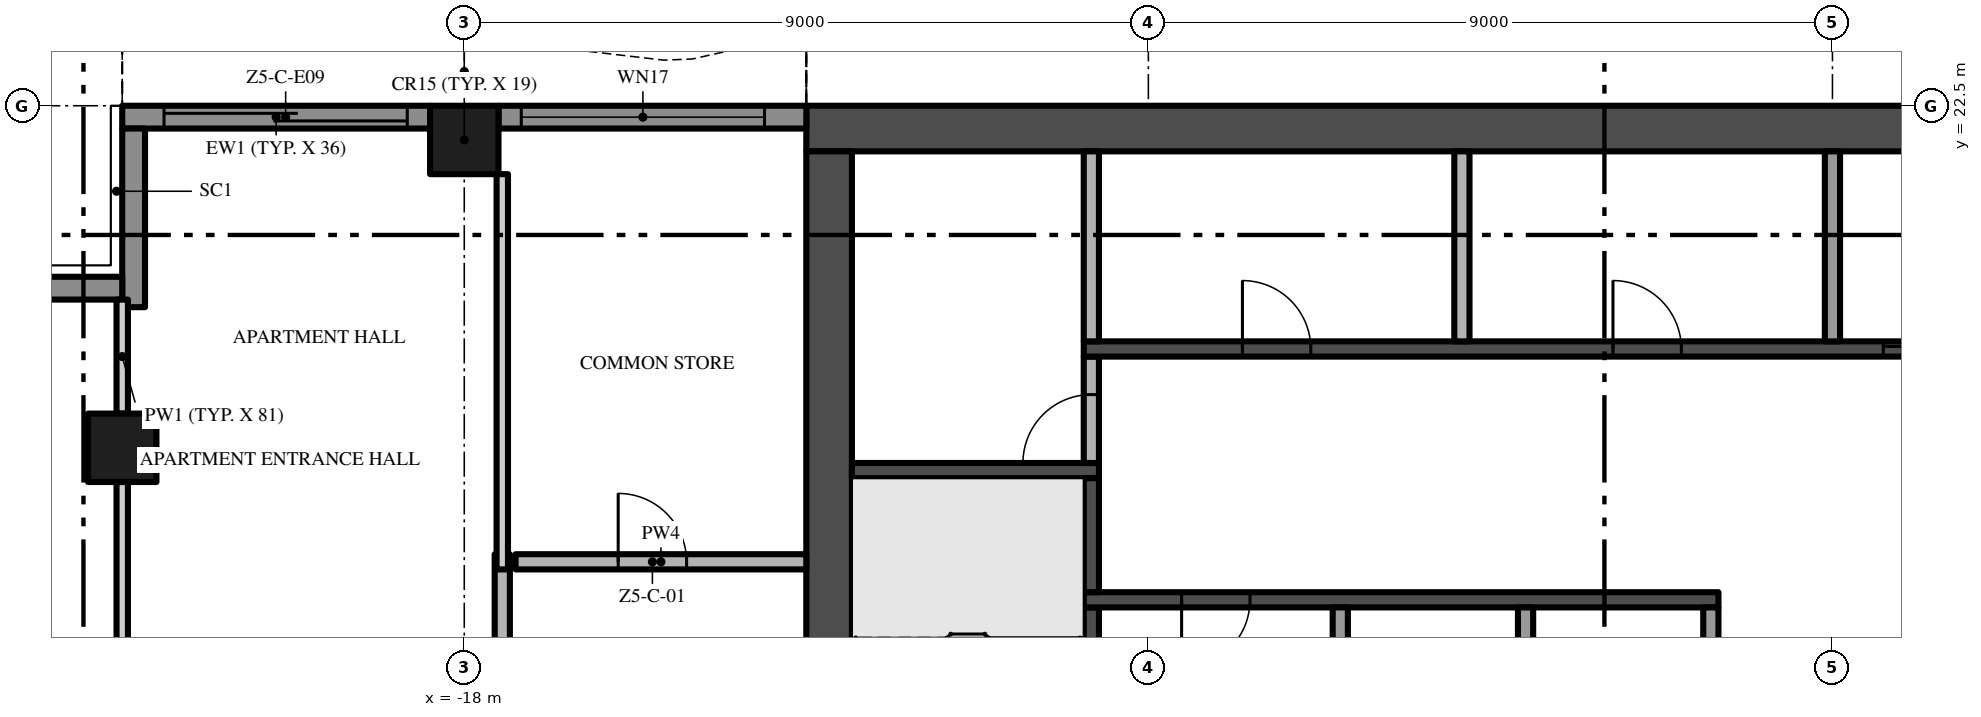
"""IFC4 building model, lengths in metres.
Left out: names, types, materials, properties, quantities, classifications, styles, units other than length and angle.
Written with IfcOpenShell. Run it as: python <this file> out.ifc"""

import sys

from ifc_helpers import new_model, si_unit, direction, frame, frame_2d, origin, origin_2d, place, context, subcontext, project, spatial, polyline, rectangle, outline, extrude, element, fill, save


model = new_model("IFC4")
c1 = context("Model", 3, precision=1e-05, world=origin(), true_north=direction((0.0, 1.0)))
c2 = subcontext(c1, "Body", "Model", "MODEL_VIEW")
j1 = project(units=[si_unit("LENGTHUNIT", "METRE"), si_unit("PLANEANGLEUNIT", "RADIAN")], contexts=[c1])
p1 = place(None, origin())
s1 = spatial("IfcSite", under=j1, at=p1, CompositionType="ELEMENT")
p2 = place(p1, origin())
s2 = spatial("IfcBuilding", under=s1, at=p2, CompositionType="ELEMENT")
p3 = place(p2, frame((0.0, 0.0, 261.6)))
s3 = spatial("IfcBuildingStorey", under=s2, at=p3, CompositionType="ELEMENT", Elevation=261.6)
p4 = place(p3, frame((13.5, 22.2, -0.3), z_axis=(0.0, 0.0, 1.0), x_axis=(-1.0, 0.0, 0.0)))
e1 = element("IfcWall", 1, at=p4, inside=s3, PredefinedType="SHEAR", context=c2, shape_type="SweptSolid", body=[
    extrude(rectangle(XDim=27.0, YDim=0.6, at=frame_2d((13.5, 0.0))), origin(), (0.0, 0.0, 1.0), 3.8),
])
p5 = place(p3, frame((-13.2, 21.9, -0.3), z_axis=(0.0, 0.0, 1.0), x_axis=(0.0, -1.0, 0.0)))
e2 = element("IfcWall", 2, at=p5, inside=s3, PredefinedType="SHEAR", context=c2, shape_type="SweptSolid", body=[
    extrude(rectangle(XDim=16.8, YDim=0.6, at=frame_2d((8.4, 0.0))), origin(), (0.0, 0.0, 1.0), 3.8),
])
p6 = place(p5, frame((9.3, 0.0, 0.3)))
e3 = element("IfcOpeningElement", 3, at=p6, cuts=e2, PredefinedType="OPENING", context=c2, shape_type="SweptSolid", body=[
    extrude(rectangle(XDim=1.2, YDim=2.2, at=frame_2d((0.6, 1.1))), frame((0.0, 0.31, 0.0), z_axis=(0.0, -1.0, 0.0), x_axis=(1.0, 0.0, 0.0)), (0.0, 0.0, 1.0), 0.62),
])
for number, where, z_axis, x_axis in (
    (4, (-18.0, 22.05, 0.0), (0.0, 0.0, 1.0), (1.0, 0.0, 0.0)),
    (5, (-22.5, 18.0, 0.0), (0.0, 0.0, 1.0), (1.0, 0.0, 0.0)),
):
    element("IfcColumn", number, at=place(p3, frame(where, z_axis=z_axis, x_axis=x_axis)), inside=s3, PredefinedType="COLUMN", context=c2, shape_type="SweptSolid", body=[
        extrude(rectangle(XDim=0.9, YDim=0.9, at=origin_2d()), origin(), (0.0, 0.0, 1.0), 3.5),
    ])
p7 = place(p3, frame((-17.55, 22.35, 0.0), z_axis=(0.0, 0.0, 1.0), x_axis=(1.0, 0.0, 0.0)))
e6 = element("IfcWall", 6, at=p7, inside=s3, PredefinedType="SOLIDWALL", context=c2, shape_type="SweptSolid", body=[
    extrude(rectangle(XDim=4.05, YDim=0.3, at=frame_2d((2.025, 0.0))), origin(), (0.0, 0.0, 1.0), 3.5),
])
p8 = place(p7, frame((0.3, 0.0, 0.45)))
e7 = element("IfcOpeningElement", 7, at=p8, cuts=e6, PredefinedType="OPENING", context=c2, shape_type="SweptSolid", body=[
    extrude(rectangle(XDim=3.2, YDim=2.65, at=frame_2d((1.6, 1.325))), frame((0.0, 0.16, 0.0), z_axis=(0.0, -1.0, 0.0), x_axis=(1.0, 0.0, 0.0)), (0.0, 0.0, 1.0), 0.32),
])
p9 = place(p3, frame((-22.5, 22.35, 0.0), z_axis=(0.0, 0.0, 1.0), x_axis=(1.0, 0.0, 0.0)))
e8 = element("IfcWall", 8, at=p9, inside=s3, PredefinedType="SOLIDWALL", context=c2, shape_type="SweptSolid", body=[
    extrude(rectangle(XDim=4.05, YDim=0.3, at=frame_2d((2.025, 0.0))), origin(), (0.0, 0.0, 1.0), 3.5),
])
p10 = place(p9, frame((0.55, 0.0, 0.0)))
e9 = element("IfcOpeningElement", 9, at=p10, cuts=e8, PredefinedType="OPENING", context=c2, shape_type="SweptSolid", body=[
    extrude(rectangle(XDim=3.2, YDim=2.4, at=frame_2d((1.6, 1.2))), frame((0.0, 0.16, 0.0), z_axis=(0.0, -1.0, 0.0), x_axis=(1.0, 0.0, 0.0)), (0.0, 0.0, 1.0), 0.32),
])
p11 = place(p3, frame((-22.35, 19.85, 0.0), z_axis=(0.0, 0.0, 1.0), x_axis=(0.0, 1.0, 0.0)))
e10 = element("IfcWall", 10, at=p11, inside=s3, PredefinedType="SOLIDWALL", context=c2, shape_type="SweptSolid", body=[
    extrude(rectangle(XDim=2.35, YDim=0.3, at=frame_2d((1.175, 0.0))), origin(), (0.0, 0.0, 1.0), 3.5),
])
p12 = place(p3, frame((-24.75, 20.1, 0.0), z_axis=(0.0, 0.0, 1.0), x_axis=(1.0, 0.0, 0.0)))
e11 = element("IfcWall", 11, at=p12, inside=s3, PredefinedType="SOLIDWALL", context=c2, shape_type="SweptSolid", body=[
    extrude(rectangle(XDim=2.25, YDim=0.3, at=frame_2d((1.125, 0.0))), origin(), (0.0, 0.0, 1.0), 3.5),
])
p13 = place(p3, origin())
e12 = element("IfcWall", 12, at=p13, inside=s3, PredefinedType="USERDEFINED", context=c2, shape_type="SweptSolid", body=[
    extrude(outline(polyline([(-13.5, 23.451), (-15.0, 23.115), (-15.375, 23.1), (-16.5, 23.231), (-18.0, 23.755), (-19.5, 24.488), (-21.0, 25.149), (-22.5, 25.485), (-22.555, 25.241), (-21.079, 24.91), (-19.605, 24.261), (-18.096, 23.524), (-16.556, 22.986), (-15.385, 22.849), (-14.967, 22.866), (-13.445, 23.208), (-13.5, 23.451)])), origin(), (0.0, 0.0, 1.0), 0.9),
])
p14 = place(p3, frame((-12.9, 17.7, 0.0), z_axis=(0.0, 0.0, 1.0), x_axis=(1.0, 0.0, 0.0)))
e13 = element("IfcWall", 13, at=p14, inside=s3, PredefinedType="SHEAR", context=c2, shape_type="SweptSolid", body=[
    extrude(rectangle(XDim=3.25, YDim=0.2, at=frame_2d((1.625, 0.0))), origin(), (0.0, 0.0, 1.0), 3.5),
])
p15 = place(p3, frame((-9.75, 12.7, 0.0), z_axis=(0.0, 0.0, 1.0), x_axis=(0.0, 1.0, 0.0)))
e14 = element("IfcWall", 14, at=p15, inside=s3, PredefinedType="SHEAR", context=c2, shape_type="SweptSolid", body=[
    extrude(rectangle(XDim=3.2, YDim=0.2, at=frame_2d((1.6, 0.0))), origin(), (0.0, 0.0, 1.0), 3.5),
])
p16 = place(p3, frame((-1.5, 16.0, 0.0), z_axis=(0.0, 0.0, 1.0), x_axis=(-1.0, 0.0, 0.0)))
e15 = element("IfcWall", 15, at=p16, inside=s3, PredefinedType="SHEAR", context=c2, shape_type="SweptSolid", body=[
    extrude(rectangle(XDim=8.35, YDim=0.2, at=frame_2d((4.175, 0.0))), origin(), (0.0, 0.0, 1.0), 3.5),
])
p17 = place(p16, frame((6.162, 0.0, 0.0)))
e16 = element("IfcOpeningElement", 16, at=p17, cuts=e15, PredefinedType="OPENING", context=c2, shape_type="SweptSolid", body=[
    extrude(rectangle(XDim=0.9, YDim=2.1, at=frame_2d((0.45, 1.05))), frame((0.0, 0.11, 0.0), z_axis=(0.0, -1.0, 0.0), x_axis=(1.0, 0.0, 0.0)), (0.0, 0.0, 1.0), 0.22),
])
p18 = place(p3, frame((-9.75, 16.1, 0.0), z_axis=(0.0, 0.0, 1.0), x_axis=(0.0, 1.0, 0.0)))
e17 = element("IfcWall", 17, at=p18, inside=s3, PredefinedType="SHEAR", context=c2, shape_type="SweptSolid", body=[
    extrude(rectangle(XDim=1.5, YDim=0.2, at=frame_2d((0.75, 0.0))), origin(), (0.0, 0.0, 1.0), 3.5),
])
p19 = place(p3, frame((-9.75, 17.8, 0.0), z_axis=(0.0, 0.0, 1.0), x_axis=(0.0, 1.0, 0.0)))
e18 = element("IfcWall", 18, at=p19, inside=s3, PredefinedType="PARTITIONING", context=c2, shape_type="SweptSolid", body=[
    extrude(rectangle(XDim=1.4, YDim=0.2, at=frame_2d((0.7, 0.0))), origin(), (0.0, 0.0, 1.0), 3.5),
])
p20 = place(p19, origin())
e19 = element("IfcOpeningElement", 19, at=p20, cuts=e18, PredefinedType="OPENING", context=c2, shape_type="SweptSolid", body=[
    extrude(rectangle(XDim=0.9, YDim=2.1, at=frame_2d((0.45, 1.05))), frame((0.0, 0.11, 0.0), z_axis=(0.0, -1.0, 0.0), x_axis=(1.0, 0.0, 0.0)), (0.0, 0.0, 1.0), 0.22),
])
p21 = place(p3, frame((-9.85, 19.3, 0.0), z_axis=(0.0, 0.0, 1.0), x_axis=(1.0, 0.0, 0.0)))
e20 = element("IfcWall", 20, at=p21, inside=s3, PredefinedType="SHEAR", context=c2, shape_type="SweptSolid", body=[
    extrude(rectangle(XDim=19.7, YDim=0.2, at=frame_2d((9.85, 0.0))), origin(), (0.0, 0.0, 1.0), 3.5),
])
p22 = place(p21, frame((10.519, 0.0, 0.0)))
e21 = element("IfcOpeningElement", 21, at=p22, cuts=e20, PredefinedType="OPENING", context=c2, shape_type="SweptSolid", body=[
    extrude(rectangle(XDim=1.1, YDim=2.1, at=frame_2d((0.55, 1.05))), frame((0.0, 0.11, 0.0), z_axis=(0.0, -1.0, 0.0), x_axis=(1.0, 0.0, 0.0)), (0.0, 0.0, 1.0), 0.22),
])
p23 = place(p21, frame((12.956, 0.0, 0.0)))
e22 = element("IfcOpeningElement", 22, at=p23, cuts=e20, PredefinedType="OPENING", context=c2, shape_type="SweptSolid", body=[
    extrude(rectangle(XDim=1.1, YDim=2.1, at=frame_2d((0.55, 1.05))), frame((0.0, 0.11, 0.0), z_axis=(0.0, -1.0, 0.0), x_axis=(1.0, 0.0, 0.0)), (0.0, 0.0, 1.0), 0.22),
])
p24 = place(p21, frame((15.394, 0.0, 0.0)))
e23 = element("IfcOpeningElement", 23, at=p24, cuts=e20, PredefinedType="OPENING", context=c2, shape_type="SweptSolid", body=[
    extrude(rectangle(XDim=1.1, YDim=2.1, at=frame_2d((0.55, 1.05))), frame((0.0, 0.11, 0.0), z_axis=(0.0, -1.0, 0.0), x_axis=(1.0, 0.0, 0.0)), (0.0, 0.0, 1.0), 0.22),
])
p25 = place(p21, frame((17.831, 0.0, 0.0)))
e24 = element("IfcOpeningElement", 24, at=p25, cuts=e20, PredefinedType="OPENING", context=c2, shape_type="SweptSolid", body=[
    extrude(rectangle(XDim=1.1, YDim=2.1, at=frame_2d((0.55, 1.05))), frame((0.0, 0.11, 0.0), z_axis=(0.0, -1.0, 0.0), x_axis=(1.0, 0.0, 0.0)), (0.0, 0.0, 1.0), 0.22),
])
p26 = place(p21, frame((2.087, 0.0, 0.0)))
e25 = element("IfcOpeningElement", 25, at=p26, cuts=e20, PredefinedType="OPENING", context=c2, shape_type="SweptSolid", body=[
    extrude(rectangle(XDim=0.9, YDim=2.1, at=frame_2d((0.45, 1.05))), frame((0.0, 0.11, 0.0), z_axis=(0.0, -1.0, 0.0), x_axis=(1.0, 0.0, 0.0)), (0.0, 0.0, 1.0), 0.22),
])
p27 = place(p21, frame((6.963, 0.0, 0.0)))
e26 = element("IfcOpeningElement", 26, at=p27, cuts=e20, PredefinedType="OPENING", context=c2, shape_type="SweptSolid", body=[
    extrude(rectangle(XDim=0.9, YDim=2.1, at=frame_2d((0.45, 1.05))), frame((0.0, 0.11, 0.0), z_axis=(0.0, -1.0, 0.0), x_axis=(1.0, 0.0, 0.0)), (0.0, 0.0, 1.0), 0.22),
])
p28 = place(p3, frame((-9.75, 19.4, 0.0), z_axis=(0.0, 0.0, 1.0), x_axis=(0.0, 1.0, 0.0)))
e27 = element("IfcWall", 27, at=p28, inside=s3, PredefinedType="PARTITIONING", context=c2, shape_type="SweptSolid", body=[
    extrude(rectangle(XDim=2.5, YDim=0.2, at=frame_2d((1.25, 0.0))), origin(), (0.0, 0.0, 1.0), 3.5),
])
p29 = place(p3, frame((-6.475, 13.7, 0.0), z_axis=(0.0, 0.0, 1.0), x_axis=(0.0, 1.0, 0.0)))
e28 = element("IfcWall", 28, at=p29, inside=s3, PredefinedType="PARTITIONING", context=c2, shape_type="SweptSolid", body=[
    extrude(rectangle(XDim=2.2, YDim=0.2, at=frame_2d((1.1, 0.0))), origin(), (0.0, 0.0, 1.0), 3.5),
])
p30 = place(p3, frame((-4.875, 19.4, 0.0), z_axis=(0.0, 0.0, 1.0), x_axis=(0.0, 1.0, 0.0)))
e29 = element("IfcWall", 29, at=p30, inside=s3, PredefinedType="PARTITIONING", context=c2, shape_type="SweptSolid", body=[
    extrude(rectangle(XDim=2.5, YDim=0.2, at=frame_2d((1.25, 0.0))), origin(), (0.0, 0.0, 1.0), 3.5),
])
for number, where, z_axis, x_axis in (
    (30, (-4.037, 13.7, 0.0), (0.0, 0.0, 1.0), (0.0, 1.0, 0.0)),
    (31, (-1.6, 13.7, 0.0), (0.0, 0.0, 1.0), (0.0, 1.0, 0.0)),
):
    element("IfcWall", number, at=place(p3, frame(where, z_axis=z_axis, x_axis=x_axis)), inside=s3, PredefinedType="PARTITIONING", context=c2, shape_type="SweptSolid", body=[
        extrude(rectangle(XDim=2.2, YDim=0.2, at=frame_2d((1.1, 0.0))), origin(), (0.0, 0.0, 1.0), 3.5),
    ])
p31 = place(p3, frame((0.0, 19.4, 0.0), z_axis=(0.0, 0.0, 1.0), x_axis=(0.0, 1.0, 0.0)))
e32 = element("IfcWall", 32, at=p31, inside=s3, PredefinedType="PARTITIONING", context=c2, shape_type="SweptSolid", body=[
    extrude(rectangle(XDim=2.5, YDim=0.2, at=frame_2d((1.25, 0.0))), origin(), (0.0, 0.0, 1.0), 3.5),
])
p32 = place(p3, frame((-17.325, 16.5, 0.0), z_axis=(0.0, 0.0, 1.0), x_axis=(1.0, 0.0, 0.0)))
e33 = element("IfcWall", 33, at=p32, inside=s3, PredefinedType="PARTITIONING", context=c2, shape_type="SweptSolid", body=[
    extrude(rectangle(XDim=3.825, YDim=0.2, at=frame_2d((1.913, 0.0))), origin(), (0.0, 0.0, 1.0), 3.5),
])
p33 = place(p32, frame((1.35, 0.0, 0.0)))
e34 = element("IfcOpeningElement", 34, at=p33, cuts=e33, PredefinedType="OPENING", context=c2, shape_type="SweptSolid", body=[
    extrude(rectangle(XDim=0.9, YDim=2.1, at=frame_2d((0.45, 1.05))), frame((0.0, 0.11, 0.0), z_axis=(0.0, -1.0, 0.0), x_axis=(1.0, 0.0, 0.0)), (0.0, 0.0, 1.0), 0.22),
])
p34 = place(p3, frame((-22.5, 0.1, 0.0), z_axis=(0.0, 0.0, 1.0), x_axis=(0.0, 1.0, 0.0)))
e35 = element("IfcWall", 35, at=p34, inside=s3, PredefinedType="PARTITIONING", context=c2, shape_type="SweptSolid", body=[
    extrude(rectangle(XDim=17.45, YDim=0.15, at=frame_2d((8.725, 0.0))), origin(), (0.0, 0.0, 1.0), 3.5),
])
p35 = place(p34, frame((1.65, 0.0, 0.0)))
e36 = element("IfcOpeningElement", 36, at=p35, cuts=e35, PredefinedType="OPENING", context=c2, shape_type="SweptSolid", body=[
    extrude(rectangle(XDim=1.0, YDim=2.4, at=frame_2d((0.5, 1.2))), frame((0.0, 0.085, 0.0), z_axis=(0.0, -1.0, 0.0), x_axis=(1.0, 0.0, 0.0)), (0.0, 0.0, 1.0), 0.17),
])
p36 = place(p34, frame((5.0, 0.0, 0.0)))
e37 = element("IfcOpeningElement", 37, at=p36, cuts=e35, PredefinedType="OPENING", context=c2, shape_type="SweptSolid", body=[
    extrude(rectangle(XDim=1.0, YDim=2.4, at=frame_2d((0.5, 1.2))), frame((0.0, 0.085, 0.0), z_axis=(0.0, -1.0, 0.0), x_axis=(1.0, 0.0, 0.0)), (0.0, 0.0, 1.0), 0.17),
])
p37 = place(p34, frame((13.25, 0.0, 0.0)))
e38 = element("IfcOpeningElement", 38, at=p37, cuts=e35, PredefinedType="OPENING", context=c2, shape_type="SweptSolid", body=[
    extrude(rectangle(XDim=1.8, YDim=2.4, at=frame_2d((0.9, 1.2))), frame((0.0, 0.085, 0.0), z_axis=(0.0, -1.0, 0.0), x_axis=(1.0, 0.0, 0.0)), (0.0, 0.0, 1.0), 0.17),
])
p38 = place(p3, frame((-22.5, 18.45, 0.0), z_axis=(0.0, 0.0, 1.0), x_axis=(0.0, 1.0, 0.0)))
e39 = element("IfcWall", 39, at=p38, inside=s3, PredefinedType="PARTITIONING", context=c2, shape_type="SweptSolid", body=[
    extrude(rectangle(XDim=1.5, YDim=0.15, at=frame_2d((0.75, 0.0))), origin(), (0.0, 0.0, 1.0), 3.5),
])
p39 = place(p3, frame((-17.5, 13.975, 0.0), z_axis=(0.0, 0.0, 1.0), x_axis=(0.0, 1.0, 0.0)))
e40 = element("IfcWall", 40, at=p39, inside=s3, PredefinedType="PARTITIONING", context=c2, shape_type="SweptSolid", body=[
    extrude(rectangle(XDim=2.625, YDim=0.2, at=frame_2d((1.312, 0.0))), origin(), (0.0, 0.0, 1.0), 3.5),
])
p40 = place(p39, frame((0.15, 0.0, 0.0)))
e41 = element("IfcOpeningElement", 41, at=p40, cuts=e40, PredefinedType="OPENING", context=c2, shape_type="SweptSolid", body=[
    extrude(rectangle(XDim=1.2, YDim=2.4, at=frame_2d((0.6, 1.2))), frame((0.0, 0.11, 0.0), z_axis=(0.0, -1.0, 0.0), x_axis=(1.0, 0.0, 0.0)), (0.0, 0.0, 1.0), 0.22),
])
p41 = place(p3, frame((-17.5, 16.4, 0.0), z_axis=(0.0, 0.0, 1.0), x_axis=(0.0, 1.0, 0.0)))
e42 = element("IfcWall", 42, at=p41, inside=s3, PredefinedType="PARTITIONING", context=c2, shape_type="SweptSolid", body=[
    extrude(rectangle(XDim=5.2, YDim=0.15, at=frame_2d((2.6, 0.0))), origin(), (0.0, 0.0, 1.0), 3.5),
])
p42 = place(p8, origin())
e43 = element("IfcWindow", 43, at=p42, inside=s3, PartitioningType="SINGLE_PANEL", PredefinedType="WINDOW", context=c2, shape_type="SweptSolid", body=[
    extrude(rectangle(XDim=3.2, YDim=2.65, at=frame_2d((1.6, 1.325))), frame((0.0, 0.03, 0.0), z_axis=(0.0, -1.0, 0.0), x_axis=(1.0, 0.0, 0.0)), (0.0, 0.0, 1.0), 0.06),
])
fill(e7, e43)
p43 = place(p10, origin())
e44 = element("IfcDoor", 44, at=p43, inside=s3, OperationType="SINGLE_SWING_LEFT", PredefinedType="DOOR", context=c2, shape_type="SweptSolid", body=[
    extrude(rectangle(XDim=3.2, YDim=2.4, at=frame_2d((1.6, 1.2))), frame((0.0, 0.025, 0.0), z_axis=(0.0, -1.0, 0.0), x_axis=(1.0, 0.0, 0.0)), (0.0, 0.0, 1.0), 0.05),
])
fill(e9, e44)
p44 = place(p22, origin())
e45 = element("IfcDoor", 45, at=p44, inside=s3, OperationType="SLIDING_TO_RIGHT", PredefinedType="DOOR", context=c2, shape_type="SweptSolid", body=[
    extrude(rectangle(XDim=1.1, YDim=2.1, at=frame_2d((0.55, 1.05))), frame((0.0, 0.025, 0.0), z_axis=(0.0, -1.0, 0.0), x_axis=(1.0, 0.0, 0.0)), (0.0, 0.0, 1.0), 0.05),
])
fill(e21, e45)
p45 = place(p17, origin())
e46 = element("IfcDoor", 46, at=p45, inside=s3, OperationType="SINGLE_SWING_RIGHT", PredefinedType="DOOR", context=c2, shape_type="SweptSolid", body=[
    extrude(rectangle(XDim=0.9, YDim=2.1, at=frame_2d((0.45, 1.05))), frame((0.0, 0.025, 0.0), z_axis=(0.0, -1.0, 0.0), x_axis=(1.0, 0.0, 0.0)), (0.0, 0.0, 1.0), 0.05),
])
fill(e16, e46)
p46 = place(p20, origin())
e47 = element("IfcDoor", 47, at=p46, inside=s3, OperationType="SINGLE_SWING_LEFT", PredefinedType="DOOR", context=c2, shape_type="SweptSolid", body=[
    extrude(rectangle(XDim=0.9, YDim=2.1, at=frame_2d((0.45, 1.05))), frame((0.0, 0.025, 0.0), z_axis=(0.0, -1.0, 0.0), x_axis=(1.0, 0.0, 0.0)), (0.0, 0.0, 1.0), 0.05),
])
fill(e19, e47)
p47 = place(p26, origin())
e48 = element("IfcDoor", 48, at=p47, inside=s3, OperationType="SINGLE_SWING_LEFT", PredefinedType="DOOR", context=c2, shape_type="SweptSolid", body=[
    extrude(rectangle(XDim=0.9, YDim=2.1, at=frame_2d((0.45, 1.05))), frame((0.0, 0.025, 0.0), z_axis=(0.0, -1.0, 0.0), x_axis=(1.0, 0.0, 0.0)), (0.0, 0.0, 1.0), 0.05),
])
fill(e25, e48)
p48 = place(p27, origin())
e49 = element("IfcDoor", 49, at=p48, inside=s3, OperationType="SINGLE_SWING_LEFT", PredefinedType="DOOR", context=c2, shape_type="SweptSolid", body=[
    extrude(rectangle(XDim=0.9, YDim=2.1, at=frame_2d((0.45, 1.05))), frame((0.0, 0.025, 0.0), z_axis=(0.0, -1.0, 0.0), x_axis=(1.0, 0.0, 0.0)), (0.0, 0.0, 1.0), 0.05),
])
fill(e26, e49)
p49 = place(p33, origin())
e50 = element("IfcDoor", 50, at=p49, inside=s3, OperationType="SINGLE_SWING_LEFT", PredefinedType="DOOR", context=c2, shape_type="SweptSolid", body=[
    extrude(rectangle(XDim=0.9, YDim=2.1, at=frame_2d((0.45, 1.05))), frame((0.0, 0.025, 0.0), z_axis=(0.0, -1.0, 0.0), x_axis=(1.0, 0.0, 0.0)), (0.0, 0.0, 1.0), 0.05),
])
fill(e34, e50)
save(model, sys.argv[1])
